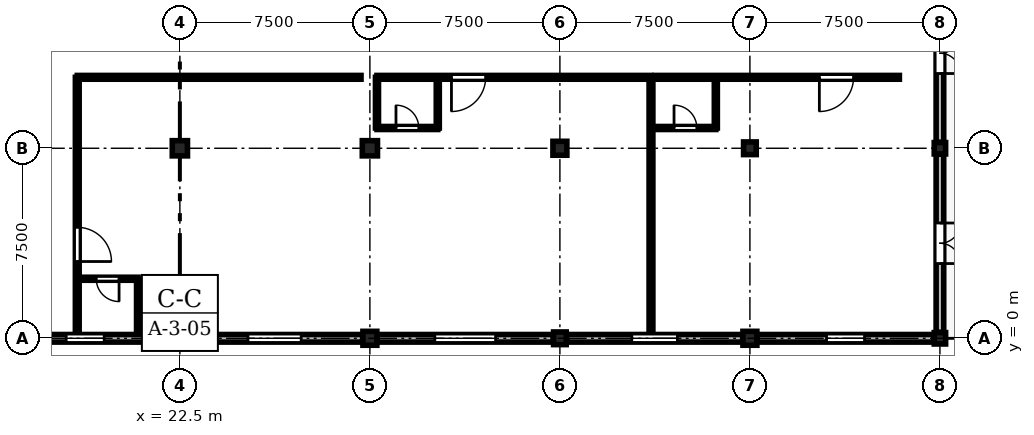
"""IFC4 building model, lengths in metres.
Left out: names, types, materials, properties, quantities, classifications, styles, units other than length and angle.
Written with IfcOpenShell. Run it as: python <this file> out.ifc"""

import sys

from ifc_helpers import new_model, si_unit, direction, frame, frame_2d, origin, origin_2d, place, context, subcontext, project, spatial, rectangle, extrude, element, fill, save


model = new_model("IFC4")
c1 = context("Model", 3, precision=1e-05, world=origin(), true_north=direction((0.0, 1.0)))
c2 = subcontext(c1, "Body", "Model", "MODEL_VIEW")
j1 = project(units=[si_unit("LENGTHUNIT", "METRE"), si_unit("PLANEANGLEUNIT", "RADIAN")], contexts=[c1])
p1 = place(None, origin())
s1 = spatial("IfcSite", under=j1, at=p1, CompositionType="ELEMENT")
p2 = place(p1, origin())
s2 = spatial("IfcBuilding", under=s1, at=p2, CompositionType="ELEMENT")
p3 = place(p2, frame((0.0, 0.0, 21.9)))
s3 = spatial("IfcBuildingStorey", under=s2, at=p3, CompositionType="ELEMENT", Elevation=21.9)
p4 = place(p3, frame((22.5, 0.0, 0.0), z_axis=(0.0, 0.0, 1.0), x_axis=(1.0, 0.0, 0.0)))
e1 = element("IfcColumn", 1, at=p4, inside=s3, PredefinedType="COLUMN", context=c2, shape_type="SweptSolid", body=[
    extrude(rectangle(XDim=0.5, YDim=0.5, at=origin_2d()), origin(), (0.0, 0.0, 1.0), 4.05),
])
p5 = place(p3, frame((22.5, 7.5, 0.0), z_axis=(0.0, 0.0, 1.0), x_axis=(1.0, 0.0, 0.0)))
e2 = element("IfcColumn", 2, at=p5, inside=s3, PredefinedType="COLUMN", context=c2, shape_type="SweptSolid", body=[
    extrude(rectangle(XDim=0.6, YDim=0.6, at=origin_2d()), origin(), (0.0, 0.0, 1.0), 4.05),
])
p6 = place(p3, frame((30.0, 0.0, 0.0), z_axis=(0.0, 0.0, 1.0), x_axis=(1.0, 0.0, 0.0)))
e3 = element("IfcColumn", 3, at=p6, inside=s3, PredefinedType="COLUMN", context=c2, shape_type="SweptSolid", body=[
    extrude(rectangle(XDim=0.55, YDim=0.55, at=origin_2d()), origin(), (0.0, 0.0, 1.0), 4.05),
])
p7 = place(p3, frame((30.0, 7.5, 0.0), z_axis=(0.0, 0.0, 1.0), x_axis=(1.0, 0.0, 0.0)))
e4 = element("IfcColumn", 4, at=p7, inside=s3, PredefinedType="COLUMN", context=c2, shape_type="SweptSolid", body=[
    extrude(rectangle(XDim=0.6, YDim=0.6, at=origin_2d()), origin(), (0.0, 0.0, 1.0), 4.05),
])
p8 = place(p3, frame((37.5, 0.0, 0.0), z_axis=(0.0, 0.0, 1.0), x_axis=(1.0, 0.0, 0.0)))
e5 = element("IfcColumn", 5, at=p8, inside=s3, PredefinedType="COLUMN", context=c2, shape_type="SweptSolid", body=[
    extrude(rectangle(XDim=0.5, YDim=0.5, at=origin_2d()), origin(), (0.0, 0.0, 1.0), 4.05),
])
for number, where, z_axis, x_axis in (
    (6, (37.5, 7.5, 0.0), (0.0, 0.0, 1.0), (1.0, 0.0, 0.0)),
    (7, (45.0, 0.0, 0.0), (0.0, 0.0, 1.0), (1.0, 0.0, 0.0)),
):
    element("IfcColumn", number, at=place(p3, frame(where, z_axis=z_axis, x_axis=x_axis)), inside=s3, PredefinedType="COLUMN", context=c2, shape_type="SweptSolid", body=[
        extrude(rectangle(XDim=0.55, YDim=0.55, at=origin_2d()), origin(), (0.0, 0.0, 1.0), 4.05),
    ])
p9 = place(p3, frame((45.0, 7.5, 0.0), z_axis=(0.0, 0.0, 1.0), x_axis=(1.0, 0.0, 0.0)))
e8 = element("IfcColumn", 8, at=p9, inside=s3, PredefinedType="COLUMN", context=c2, shape_type="SweptSolid", body=[
    extrude(rectangle(XDim=0.5, YDim=0.5, at=origin_2d()), origin(), (0.0, 0.0, 1.0), 4.05),
])
for number, where, z_axis, x_axis in (
    (9, (52.5, 0.0, 0.0), (0.0, 0.0, 1.0), (1.0, 0.0, 0.0)),
    (10, (52.5, 7.5, 0.0), (0.0, 0.0, 1.0), (1.0, 0.0, 0.0)),
):
    element("IfcColumn", number, at=place(p3, frame(where, z_axis=z_axis, x_axis=x_axis)), inside=s3, PredefinedType="COLUMN", context=c2, shape_type="SweptSolid", body=[
        extrude(rectangle(XDim=0.45, YDim=0.45, at=origin_2d()), origin(), (0.0, 0.0, 1.0), 4.05),
    ])
p10 = place(p3, frame((22.24, 0.0, 0.0), z_axis=(0.0, 0.0, 1.0), x_axis=(-1.0, 0.0, 0.0)))
e11 = element("IfcWall", 11, at=p10, inside=s3, PredefinedType="STANDARD", context=c2, shape_type="SweptSolid", body=[
    extrude(rectangle(XDim=6.955, YDim=0.3, at=frame_2d((3.478, 0.0))), origin(), (0.0, 0.0, 1.0), 3.17),
])
p11 = place(p10, frame((2.728, 0.0, 0.9)))
e12 = element("IfcOpeningElement", 12, at=p11, cuts=e11, PredefinedType="OPENING", context=c2, shape_type="SweptSolid", body=[
    extrude(rectangle(XDim=1.5, YDim=1.99, at=frame_2d((0.75, 0.995))), frame((0.0, 0.16, 0.0), z_axis=(0.0, -1.0, 0.0), x_axis=(1.0, 0.0, 0.0)), (0.0, 0.0, 1.0), 0.32),
])
p12 = place(p3, frame((29.715, 0.0, 0.0), z_axis=(0.0, 0.0, 1.0), x_axis=(-1.0, 0.0, 0.0)))
e13 = element("IfcWall", 13, at=p12, inside=s3, PredefinedType="STANDARD", context=c2, shape_type="SweptSolid", body=[
    extrude(rectangle(XDim=6.955, YDim=0.3, at=frame_2d((3.478, 0.0))), origin(), (0.0, 0.0, 1.0), 3.17),
])
p13 = place(p12, frame((2.427, 0.0, 0.9)))
e14 = element("IfcOpeningElement", 14, at=p13, cuts=e13, PredefinedType="OPENING", context=c2, shape_type="SweptSolid", body=[
    extrude(rectangle(XDim=2.1, YDim=1.99, at=frame_2d((1.05, 0.995))), frame((0.0, 0.16, 0.0), z_axis=(0.0, -1.0, 0.0), x_axis=(1.0, 0.0, 0.0)), (0.0, 0.0, 1.0), 0.32),
])
p14 = place(p3, frame((37.24, 0.0, 0.0), z_axis=(0.0, 0.0, 1.0), x_axis=(-1.0, 0.0, 0.0)))
e15 = element("IfcWall", 15, at=p14, inside=s3, PredefinedType="STANDARD", context=c2, shape_type="SweptSolid", body=[
    extrude(rectangle(XDim=6.955, YDim=0.3, at=frame_2d((3.478, 0.0))), origin(), (0.0, 0.0, 1.0), 3.17),
])
p15 = place(p14, frame((2.278, 0.0, 0.9)))
e16 = element("IfcOpeningElement", 16, at=p15, cuts=e15, PredefinedType="OPENING", context=c2, shape_type="SweptSolid", body=[
    extrude(rectangle(XDim=2.4, YDim=1.99, at=frame_2d((1.2, 0.995))), frame((0.0, 0.16, 0.0), z_axis=(0.0, -1.0, 0.0), x_axis=(1.0, 0.0, 0.0)), (0.0, 0.0, 1.0), 0.32),
])
p16 = place(p3, frame((44.715, 0.0, 0.0), z_axis=(0.0, 0.0, 1.0), x_axis=(-1.0, 0.0, 0.0)))
e17 = element("IfcWall", 17, at=p16, inside=s3, PredefinedType="STANDARD", context=c2, shape_type="SweptSolid", body=[
    extrude(rectangle(XDim=6.955, YDim=0.3, at=frame_2d((3.478, 0.0))), origin(), (0.0, 0.0, 1.0), 3.17),
])
p17 = place(p16, frame((2.577, 0.0, 0.9)))
e18 = element("IfcOpeningElement", 18, at=p17, cuts=e17, PredefinedType="OPENING", context=c2, shape_type="SweptSolid", body=[
    extrude(rectangle(XDim=1.8, YDim=1.99, at=frame_2d((0.9, 0.995))), frame((0.0, 0.16, 0.0), z_axis=(0.0, -1.0, 0.0), x_axis=(1.0, 0.0, 0.0)), (0.0, 0.0, 1.0), 0.32),
])
p18 = place(p3, frame((52.265, 0.0, 0.0), z_axis=(0.0, 0.0, 1.0), x_axis=(-1.0, 0.0, 0.0)))
e19 = element("IfcWall", 19, at=p18, inside=s3, PredefinedType="STANDARD", context=c2, shape_type="SweptSolid", body=[
    extrude(rectangle(XDim=6.98, YDim=0.3, at=frame_2d((3.49, 0.0))), origin(), (0.0, 0.0, 1.0), 3.17),
])
p19 = place(p18, frame((2.74, 0.0, 0.9)))
e20 = element("IfcOpeningElement", 20, at=p19, cuts=e19, PredefinedType="OPENING", context=c2, shape_type="SweptSolid", body=[
    extrude(rectangle(XDim=1.5, YDim=1.99, at=frame_2d((0.75, 0.995))), frame((0.0, 0.16, 0.0), z_axis=(0.0, -1.0, 0.0), x_axis=(1.0, 0.0, 0.0)), (0.0, 0.0, 1.0), 0.32),
])
p20 = place(p3, frame((52.5, 7.265, 0.0), z_axis=(0.0, 0.0, 1.0), x_axis=(0.0, -1.0, 0.0)))
e21 = element("IfcWall", 21, at=p20, inside=s3, PredefinedType="STANDARD", context=c2, shape_type="SweptSolid", body=[
    extrude(rectangle(XDim=7.03, YDim=0.3, at=frame_2d((3.515, 0.0))), origin(), (0.0, 0.0, 1.0), 3.17),
])
p21 = place(p20, frame((2.715, 0.0, 0.0)))
e22 = element("IfcOpeningElement", 22, at=p21, cuts=e21, PredefinedType="OPENING", context=c2, shape_type="SweptSolid", body=[
    extrude(rectangle(XDim=1.6, YDim=2.35, at=frame_2d((0.8, 1.175))), frame((0.0, 0.16, 0.0), z_axis=(0.0, -1.0, 0.0), x_axis=(1.0, 0.0, 0.0)), (0.0, 0.0, 1.0), 0.32),
])
p22 = place(p3, frame((52.5, 14.765, 0.0), z_axis=(0.0, 0.0, 1.0), x_axis=(0.0, -1.0, 0.0)))
e23 = element("IfcWall", 23, at=p22, inside=s3, PredefinedType="STANDARD", context=c2, shape_type="SweptSolid", body=[
    extrude(rectangle(XDim=7.03, YDim=0.3, at=frame_2d((3.515, 0.0))), origin(), (0.0, 0.0, 1.0), 3.17),
])
p23 = place(p22, frame((2.715, 0.0, 0.0)))
e24 = element("IfcOpeningElement", 24, at=p23, cuts=e23, PredefinedType="OPENING", context=c2, shape_type="SweptSolid", body=[
    extrude(rectangle(XDim=1.6, YDim=2.35, at=frame_2d((0.8, 1.175))), frame((0.0, 0.16, 0.0), z_axis=(0.0, -1.0, 0.0), x_axis=(1.0, 0.0, 0.0)), (0.0, 0.0, 1.0), 0.32),
])
p24 = place(p3, frame((18.45, 10.3, 0.0), z_axis=(0.0, 0.0, 1.0), x_axis=(0.0, -1.0, 0.0)))
e25 = element("IfcWall", 25, at=p24, inside=s3, PredefinedType="PARTITIONING", context=c2, shape_type="SweptSolid", body=[
    extrude(rectangle(XDim=9.95, YDim=0.15, at=frame_2d((4.975, 0.0))), origin(), (0.0, 0.0, 1.0), 3.755),
])
p25 = place(p24, frame((5.92, 0.0, 0.0)))
e26 = element("IfcOpeningElement", 26, at=p25, cuts=e25, PredefinedType="OPENING", context=c2, shape_type="SweptSolid", body=[
    extrude(rectangle(XDim=1.35, YDim=2.25, at=frame_2d((0.675, 1.125))), frame((0.0, 0.085, 0.0), z_axis=(0.0, -1.0, 0.0), x_axis=(1.0, 0.0, 0.0)), (0.0, 0.0, 1.0), 0.17),
])
p26 = place(p3, frame((20.85, 2.35, 0.0), z_axis=(0.0, 0.0, 1.0), x_axis=(-1.0, 0.0, 0.0)))
e27 = element("IfcWall", 27, at=p26, inside=s3, PredefinedType="PARTITIONING", context=c2, shape_type="SweptSolid", body=[
    extrude(rectangle(XDim=2.4, YDim=0.12, at=frame_2d((1.2, 0.0))), origin(), (0.0, 0.0, 1.0), 3.755),
])
p27 = place(p26, frame((0.75, 0.0, 0.0)))
e28 = element("IfcOpeningElement", 28, at=p27, cuts=e27, PredefinedType="OPENING", context=c2, shape_type="SweptSolid", body=[
    extrude(rectangle(XDim=0.9, YDim=2.1, at=frame_2d((0.45, 1.05))), frame((0.0, 0.07, 0.0), z_axis=(0.0, -1.0, 0.0), x_axis=(1.0, 0.0, 0.0)), (0.0, 0.0, 1.0), 0.14),
])
p28 = place(p3, frame((20.85, 0.35, 0.0), z_axis=(0.0, 0.0, 1.0), x_axis=(0.0, 1.0, 0.0)))
e29 = element("IfcWall", 29, at=p28, inside=s3, PredefinedType="PARTITIONING", context=c2, shape_type="SweptSolid", body=[
    extrude(rectangle(XDim=2.0, YDim=0.12, at=frame_2d((1.0, 0.0))), origin(), (0.0, 0.0, 1.0), 3.755),
])
p29 = place(p3, frame((41.095, 10.3, 0.0), z_axis=(0.0, 0.0, 1.0), x_axis=(-1.0, 0.0, 0.0)))
e30 = element("IfcWall", 30, at=p29, inside=s3, PredefinedType="PARTITIONING", context=c2, shape_type="SweptSolid", body=[
    extrude(rectangle(XDim=10.815, YDim=0.15, at=frame_2d((5.407, 0.0))), origin(), (0.0, 0.0, 1.0), 3.755),
])
p30 = place(p29, frame((6.525, 0.0, 0.0)))
e31 = element("IfcOpeningElement", 31, at=p30, cuts=e30, PredefinedType="OPENING", context=c2, shape_type="SweptSolid", body=[
    extrude(rectangle(XDim=1.35, YDim=2.25, at=frame_2d((0.675, 1.125))), frame((0.0, 0.085, 0.0), z_axis=(0.0, -1.0, 0.0), x_axis=(1.0, 0.0, 0.0)), (0.0, 0.0, 1.0), 0.17),
])
p31 = place(p3, frame((30.28, 8.3, 0.0), z_axis=(0.0, 0.0, 1.0), x_axis=(1.0, 0.0, 0.0)))
e32 = element("IfcWall", 32, at=p31, inside=s3, PredefinedType="PARTITIONING", context=c2, shape_type="SweptSolid", body=[
    extrude(rectangle(XDim=2.4, YDim=0.12, at=frame_2d((1.2, 0.0))), origin(), (0.0, 0.0, 1.0), 3.755),
])
p32 = place(p31, frame((0.75, 0.0, 0.0)))
e33 = element("IfcOpeningElement", 33, at=p32, cuts=e32, PredefinedType="OPENING", context=c2, shape_type="SweptSolid", body=[
    extrude(rectangle(XDim=0.9, YDim=2.1, at=frame_2d((0.45, 1.05))), frame((0.0, 0.07, 0.0), z_axis=(0.0, -1.0, 0.0), x_axis=(1.0, 0.0, 0.0)), (0.0, 0.0, 1.0), 0.14),
])
p33 = place(p3, frame((32.68, 8.3, 0.0), z_axis=(0.0, 0.0, 1.0), x_axis=(0.0, 1.0, 0.0)))
e34 = element("IfcWall", 34, at=p33, inside=s3, PredefinedType="PARTITIONING", context=c2, shape_type="SweptSolid", body=[
    extrude(rectangle(XDim=2.0, YDim=0.12, at=frame_2d((1.0, 0.0))), origin(), (0.0, 0.0, 1.0), 3.755),
])
p34 = place(p3, frame((50.9, 10.3, 0.0), z_axis=(0.0, 0.0, 1.0), x_axis=(-1.0, 0.0, 0.0)))
e35 = element("IfcWall", 35, at=p34, inside=s3, PredefinedType="PARTITIONING", context=c2, shape_type="SweptSolid", body=[
    extrude(rectangle(XDim=9.645, YDim=0.15, at=frame_2d((4.823, 0.0))), origin(), (0.0, 0.0, 1.0), 3.755),
])
p35 = place(p34, frame((1.809, 0.0, 0.0)))
e36 = element("IfcOpeningElement", 36, at=p35, cuts=e35, PredefinedType="OPENING", context=c2, shape_type="SweptSolid", body=[
    extrude(rectangle(XDim=1.35, YDim=2.25, at=frame_2d((0.675, 1.125))), frame((0.0, 0.085, 0.0), z_axis=(0.0, -1.0, 0.0), x_axis=(1.0, 0.0, 0.0)), (0.0, 0.0, 1.0), 0.17),
])
p36 = place(p3, frame((41.255, 8.3, 0.0), z_axis=(0.0, 0.0, 1.0), x_axis=(1.0, 0.0, 0.0)))
e37 = element("IfcWall", 37, at=p36, inside=s3, PredefinedType="PARTITIONING", context=c2, shape_type="SweptSolid", body=[
    extrude(rectangle(XDim=2.4, YDim=0.12, at=frame_2d((1.2, 0.0))), origin(), (0.0, 0.0, 1.0), 3.755),
])
p37 = place(p36, frame((0.75, 0.0, 0.0)))
e38 = element("IfcOpeningElement", 38, at=p37, cuts=e37, PredefinedType="OPENING", context=c2, shape_type="SweptSolid", body=[
    extrude(rectangle(XDim=0.9, YDim=2.1, at=frame_2d((0.45, 1.05))), frame((0.0, 0.07, 0.0), z_axis=(0.0, -1.0, 0.0), x_axis=(1.0, 0.0, 0.0)), (0.0, 0.0, 1.0), 0.14),
])
p38 = place(p3, frame((43.655, 8.3, 0.0), z_axis=(0.0, 0.0, 1.0), x_axis=(0.0, 1.0, 0.0)))
e39 = element("IfcWall", 39, at=p38, inside=s3, PredefinedType="PARTITIONING", context=c2, shape_type="SweptSolid", body=[
    extrude(rectangle(XDim=2.0, YDim=0.12, at=frame_2d((1.0, 0.0))), origin(), (0.0, 0.0, 1.0), 3.755),
])
p39 = place(p3, frame((18.45, 10.3, 0.0), z_axis=(0.0, 0.0, 1.0), x_axis=(1.0, 0.0, 0.0)))
e40 = element("IfcWall", 40, at=p39, inside=s3, PredefinedType="PARTITIONING", context=c2, shape_type="SweptSolid", body=[
    extrude(rectangle(XDim=11.2, YDim=0.15, at=frame_2d((5.6, 0.0))), origin(), (0.0, 0.0, 1.0), 3.755),
])
p40 = place(p3, frame((41.095, 0.35, 0.0), z_axis=(0.0, 0.0, 1.0), x_axis=(0.0, 1.0, 0.0)))
e41 = element("IfcWall", 41, at=p40, inside=s3, PredefinedType="PARTITIONING", context=c2, shape_type="SweptSolid", body=[
    extrude(rectangle(XDim=9.95, YDim=0.15, at=frame_2d((4.975, 0.0))), origin(), (0.0, 0.0, 1.0), 3.755),
])
p41 = place(p3, frame((30.28, 8.3, 0.0), z_axis=(0.0, 0.0, 1.0), x_axis=(0.0, 1.0, 0.0)))
e42 = element("IfcWall", 42, at=p41, inside=s3, PredefinedType="PARTITIONING", context=c2, shape_type="SweptSolid", body=[
    extrude(rectangle(XDim=2.0, YDim=0.12, at=frame_2d((1.0, 0.0))), origin(), (0.0, 0.0, 1.0), 3.255),
])
p42 = place(p11, origin())
e43 = element("IfcWindow", 43, at=p42, inside=s3, PartitioningType="SINGLE_PANEL", PredefinedType="WINDOW", context=c2, shape_type="SweptSolid", body=[
    extrude(rectangle(XDim=1.5, YDim=1.99, at=frame_2d((0.75, 0.995))), frame((0.0, 0.03, 0.0), z_axis=(0.0, -1.0, 0.0), x_axis=(1.0, 0.0, 0.0)), (0.0, 0.0, 1.0), 0.06),
])
fill(e12, e43)
p43 = place(p13, origin())
e44 = element("IfcWindow", 44, at=p43, inside=s3, PartitioningType="SINGLE_PANEL", PredefinedType="WINDOW", context=c2, shape_type="SweptSolid", body=[
    extrude(rectangle(XDim=2.1, YDim=1.99, at=frame_2d((1.05, 0.995))), frame((0.0, 0.03, 0.0), z_axis=(0.0, -1.0, 0.0), x_axis=(1.0, 0.0, 0.0)), (0.0, 0.0, 1.0), 0.06),
])
fill(e14, e44)
p44 = place(p15, origin())
e45 = element("IfcWindow", 45, at=p44, inside=s3, PartitioningType="SINGLE_PANEL", PredefinedType="WINDOW", context=c2, shape_type="SweptSolid", body=[
    extrude(rectangle(XDim=2.4, YDim=1.99, at=frame_2d((1.2, 0.995))), frame((0.0, 0.03, 0.0), z_axis=(0.0, -1.0, 0.0), x_axis=(1.0, 0.0, 0.0)), (0.0, 0.0, 1.0), 0.06),
])
fill(e16, e45)
p45 = place(p17, origin())
e46 = element("IfcWindow", 46, at=p45, inside=s3, PartitioningType="SINGLE_PANEL", PredefinedType="WINDOW", context=c2, shape_type="SweptSolid", body=[
    extrude(rectangle(XDim=1.8, YDim=1.99, at=frame_2d((0.9, 0.995))), frame((0.0, 0.03, 0.0), z_axis=(0.0, -1.0, 0.0), x_axis=(1.0, 0.0, 0.0)), (0.0, 0.0, 1.0), 0.06),
])
fill(e18, e46)
p46 = place(p19, origin())
e47 = element("IfcWindow", 47, at=p46, inside=s3, PartitioningType="SINGLE_PANEL", PredefinedType="WINDOW", context=c2, shape_type="SweptSolid", body=[
    extrude(rectangle(XDim=1.5, YDim=1.99, at=frame_2d((0.75, 0.995))), frame((0.0, 0.03, 0.0), z_axis=(0.0, -1.0, 0.0), x_axis=(1.0, 0.0, 0.0)), (0.0, 0.0, 1.0), 0.06),
])
fill(e20, e47)
p47 = place(p21, origin())
e48 = element("IfcDoor", 48, at=p47, inside=s3, OperationType="DOUBLE_DOOR_SINGLE_SWING", PredefinedType="DOOR", context=c2, shape_type="SweptSolid", body=[
    extrude(rectangle(XDim=1.6, YDim=2.35, at=frame_2d((0.8, 1.175))), frame((0.0, 0.025, 0.0), z_axis=(0.0, -1.0, 0.0), x_axis=(1.0, 0.0, 0.0)), (0.0, 0.0, 1.0), 0.05),
])
fill(e22, e48)
p48 = place(p23, origin())
e49 = element("IfcDoor", 49, at=p48, inside=s3, OperationType="DOUBLE_DOOR_SINGLE_SWING", PredefinedType="DOOR", context=c2, shape_type="SweptSolid", body=[
    extrude(rectangle(XDim=1.6, YDim=2.35, at=frame_2d((0.8, 1.175))), frame((0.0, 0.025, 0.0), z_axis=(0.0, -1.0, 0.0), x_axis=(1.0, 0.0, 0.0)), (0.0, 0.0, 1.0), 0.05),
])
fill(e24, e49)
p49 = place(p25, origin())
e50 = element("IfcDoor", 50, at=p49, inside=s3, OperationType="SINGLE_SWING_RIGHT", PredefinedType="DOOR", context=c2, shape_type="SweptSolid", body=[
    extrude(rectangle(XDim=1.35, YDim=2.25, at=frame_2d((0.675, 1.125))), frame((0.0, 0.025, 0.0), z_axis=(0.0, -1.0, 0.0), x_axis=(1.0, 0.0, 0.0)), (0.0, 0.0, 1.0), 0.05),
])
fill(e26, e50)
p50 = place(p27, origin())
e51 = element("IfcDoor", 51, at=p50, inside=s3, OperationType="SINGLE_SWING_LEFT", PredefinedType="DOOR", context=c2, shape_type="SweptSolid", body=[
    extrude(rectangle(XDim=0.9, YDim=2.1, at=frame_2d((0.45, 1.05))), frame((0.0, 0.025, 0.0), z_axis=(0.0, -1.0, 0.0), x_axis=(1.0, 0.0, 0.0)), (0.0, 0.0, 1.0), 0.05),
])
fill(e28, e51)
p51 = place(p30, origin())
e52 = element("IfcDoor", 52, at=p51, inside=s3, OperationType="SINGLE_SWING_RIGHT", PredefinedType="DOOR", context=c2, shape_type="SweptSolid", body=[
    extrude(rectangle(XDim=1.35, YDim=2.25, at=frame_2d((0.675, 1.125))), frame((0.0, 0.025, 0.0), z_axis=(0.0, -1.0, 0.0), x_axis=(1.0, 0.0, 0.0)), (0.0, 0.0, 1.0), 0.05),
])
fill(e31, e52)
p52 = place(p32, origin())
e53 = element("IfcDoor", 53, at=p52, inside=s3, OperationType="SINGLE_SWING_LEFT", PredefinedType="DOOR", context=c2, shape_type="SweptSolid", body=[
    extrude(rectangle(XDim=0.9, YDim=2.1, at=frame_2d((0.45, 1.05))), frame((0.0, 0.025, 0.0), z_axis=(0.0, -1.0, 0.0), x_axis=(1.0, 0.0, 0.0)), (0.0, 0.0, 1.0), 0.05),
])
fill(e33, e53)
p53 = place(p35, origin())
e54 = element("IfcDoor", 54, at=p53, inside=s3, OperationType="SINGLE_SWING_RIGHT", PredefinedType="DOOR", context=c2, shape_type="SweptSolid", body=[
    extrude(rectangle(XDim=1.35, YDim=2.25, at=frame_2d((0.675, 1.125))), frame((0.0, 0.025, 0.0), z_axis=(0.0, -1.0, 0.0), x_axis=(1.0, 0.0, 0.0)), (0.0, 0.0, 1.0), 0.05),
])
fill(e36, e54)
p54 = place(p37, origin())
e55 = element("IfcDoor", 55, at=p54, inside=s3, OperationType="SINGLE_SWING_LEFT", PredefinedType="DOOR", context=c2, shape_type="SweptSolid", body=[
    extrude(rectangle(XDim=0.9, YDim=2.1, at=frame_2d((0.45, 1.05))), frame((0.0, 0.025, 0.0), z_axis=(0.0, -1.0, 0.0), x_axis=(1.0, 0.0, 0.0)), (0.0, 0.0, 1.0), 0.05),
])
fill(e38, e55)
save(model, sys.argv[1])
